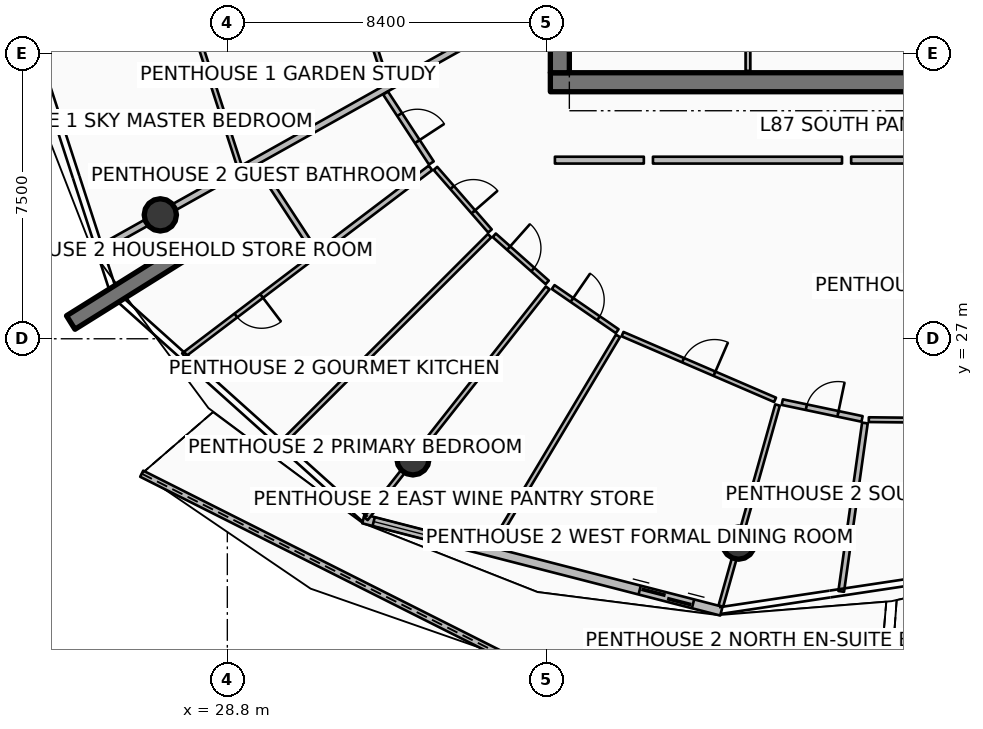
"""IFC4 building model, lengths in metres.
Left out: names, types, materials, properties, quantities, classifications, styles, units other than length and angle.
Written with IfcOpenShell. Run it as: python <this file> out.ifc"""

import sys

from ifc_helpers import new_model, si_unit, direction, frame, frame_2d, origin, origin_2d, place, context, subcontext, project, spatial, polyline, rectangle, circle, outline, extrude, element, fill, save


model = new_model("IFC4")
c1 = context("Model", 3, precision=1e-05, world=origin(), true_north=direction((0.0, 1.0)))
c2 = subcontext(c1, "Body", "Model", "MODEL_VIEW")
j1 = project(units=[si_unit("LENGTHUNIT", "METRE"), si_unit("PLANEANGLEUNIT", "RADIAN")], contexts=[c1])
p1 = place(None, origin())
s1 = spatial("IfcSite", under=j1, at=p1, CompositionType="ELEMENT")
p2 = place(p1, origin())
s2 = spatial("IfcBuilding", under=s1, at=p2, CompositionType="ELEMENT")
p3 = place(p2, frame((0.0, 0.0, 347.3)))
s3 = spatial("IfcBuildingStorey", under=s2, at=p3, CompositionType="ELEMENT", Elevation=347.3)
p4 = place(p3, frame((37.3, 33.75, 0.0), z_axis=(0.0, 0.0, 1.0), x_axis=(1.0, 0.0, 0.0)))
e1 = element("IfcWall", 1, at=p4, inside=s3, PredefinedType="SHEAR", context=c2, shape_type="SweptSolid", body=[
    extrude(rectangle(XDim=9.6, YDim=0.5, at=frame_2d((4.8, 0.0))), origin(), (0.0, 0.0, 1.0), 4.2),
])
p5 = place(p3, frame((37.55, 34.0, 0.0), z_axis=(0.0, 0.0, 1.0), x_axis=(0.0, 1.0, 0.0)))
e2 = element("IfcWall", 2, at=p5, inside=s3, PredefinedType="SHEAR", context=c2, shape_type="SweptSolid", body=[
    extrude(rectangle(XDim=16.0, YDim=0.5, at=frame_2d((8.0, 0.0))), origin(), (0.0, 0.0, 1.0), 4.2),
])
p6 = place(p3, frame((27.647, 29.282, 0.0), z_axis=(0.0, 0.0, 1.0), x_axis=(-0.848053161125, -0.529911158502, 0.0)))
e3 = element("IfcWall", 3, at=p6, inside=s3, PredefinedType="SOLIDWALL", context=c2, shape_type="SweptSolid", body=[
    extrude(rectangle(XDim=3.5, YDim=0.42, at=frame_2d((1.75, 0.0))), origin(), (0.0, 0.0, 1.0), 4.2),
])
p7 = place(p3, frame((27.037, 30.26, 0.0), z_axis=(0.234532013765, 0.131375056787, 0.96319018318), x_axis=(-0.488708510237, 0.872447128497, 0.0)))
e4 = element("IfcColumn", 4, at=p7, inside=s3, PredefinedType="COLUMN", context=c2, shape_type="SweptSolid", body=[
    extrude(circle(Radius=0.425, at=origin_2d()), origin(), (0.0, 0.0, 1.0), 3.945),
])
p8 = place(p3, frame((33.684, 23.841, 0.0), z_axis=(0.160640140705, 0.203700881396, 0.965764306709), x_axis=(-0.785213254806, 0.619225439139, 0.0)))
e5 = element("IfcColumn", 5, at=p8, inside=s3, PredefinedType="COLUMN", context=c2, shape_type="SweptSolid", body=[
    extrude(circle(Radius=0.425, at=origin_2d()), origin(), (0.0, 0.0, 1.0), 3.935),
])
p9 = place(p3, frame((42.253, 21.624, 0.0), z_axis=(0.064758926889, 0.229838041096, 0.971071962448), x_axis=(-0.96252315306, 0.271199520325, 0.0)))
e6 = element("IfcColumn", 6, at=p9, inside=s3, PredefinedType="COLUMN", context=c2, shape_type="SweptSolid", body=[
    extrude(circle(Radius=0.425, at=origin_2d()), origin(), (0.0, 0.0, 1.0), 3.913),
])
p10 = place(p3, frame((26.547, 23.449, 0.0), z_axis=(0.0, 0.0, 1.0), x_axis=(0.893288240785, -0.449484281009, 0.0)))
e7 = element("IfcWall", 7, at=p10, inside=s3, PredefinedType="PARAPET", context=c2, shape_type="SweptSolid", body=[
    extrude(outline(polyline([(0.0, 0.0), (10.573, 0.0), (10.573, 1.348), (5.287, 1.562), (0.0, 1.747), (0.0, 0.0)])), frame((0.0, 0.09, 0.0), z_axis=(0.0, -1.0, 0.0), x_axis=(1.0, 0.0, 0.0)), (0.0, 0.0, 1.0), 0.18),
])
p11 = place(p3, frame((46.298, 18.542, 0.0), z_axis=(0.0, 0.0, 1.0), x_axis=(0.977492987262, 0.210967911903, 0.0)))
e8 = element("IfcWall", 8, at=p11, inside=s3, PredefinedType="PARAPET", context=c2, shape_type="SweptSolid", body=[
    extrude(outline(polyline([(0.0, 0.0), (8.794, 0.0), (8.794, 1.348), (4.397, 1.182), (0.0, 1.12), (0.0, 0.0)])), frame((0.0, 0.09, 0.0), z_axis=(0.0, -1.0, 0.0), x_axis=(1.0, 0.0, 0.0)), (0.0, 0.0, 1.0), 0.18),
])
p12 = place(p3, frame((32.38, 22.26, 0.0), z_axis=(0.0, 0.0, 1.0), x_axis=(0.968389076094, -0.249444577616, 0.0)))
e9 = element("IfcWall", 9, at=p12, inside=s3, PredefinedType="SOLIDWALL", context=c2, shape_type="SweptSolid", body=[
    extrude(rectangle(XDim=9.728, YDim=0.24, at=frame_2d((4.864, 0.0))), origin(), (0.0, 0.0, 1.0), 2.75),
])
p13 = place(p12, frame((7.508, 0.0, 0.0)))
e10 = element("IfcOpeningElement", 10, at=p13, cuts=e9, PredefinedType="OPENING", context=c2, shape_type="SweptSolid", body=[
    extrude(rectangle(XDim=1.45, YDim=2.15, at=frame_2d((0.725, 1.075))), frame((0.0, 0.13, 0.0), z_axis=(0.0, -1.0, 0.0), x_axis=(1.0, 0.0, 0.0)), (0.0, 0.0, 1.0), 0.26),
])
p14 = place(p12, frame((0.28, 0.0, 0.65)))
e11 = element("IfcOpeningElement", 11, at=p14, cuts=e9, PredefinedType="OPENING", context=c2, shape_type="SweptSolid", body=[
    extrude(rectangle(XDim=1.6, YDim=1.5, at=frame_2d((0.8, 0.75))), frame((0.0, 0.13, 0.0), z_axis=(0.0, -1.0, 0.0), x_axis=(1.0, 0.0, 0.0)), (0.0, 0.0, 1.0), 0.26),
])
p15 = place(p3, frame((42.5, 34.05, 0.0), z_axis=(0.0, 0.0, 1.0), x_axis=(0.0, 1.0, 0.0)))
e12 = element("IfcWall", 12, at=p15, inside=s3, PredefinedType="PARTITIONING", context=c2, shape_type="SweptSolid", body=[
    extrude(rectangle(XDim=2.03, YDim=0.125, at=frame_2d((1.015, 0.0))), origin(), (0.0, 0.0, 1.0), 3.24),
])
p16 = place(p3, frame((37.204, 35.954, 0.0), z_axis=(0.0, 0.0, 1.0), x_axis=(-0.872495191914, -0.488622697064, 0.0)))
e13 = element("IfcWall", 13, at=p16, inside=s3, PredefinedType="PARTITIONING", context=c2, shape_type="SweptSolid", body=[
    extrude(rectangle(XDim=13.462, YDim=0.18, at=frame_2d((6.731, 0.0))), origin(), (0.0, 0.0, 1.0), 2.757),
])
p17 = place(p3, frame((30.99, 39.878, 0.0), z_axis=(0.0, 0.0, 1.0), x_axis=(0.309026406972, -0.951053457905, 0.0)))
e14 = element("IfcWall", 14, at=p17, inside=s3, PredefinedType="PARTITIONING", context=c2, shape_type="SweptSolid", body=[
    extrude(rectangle(XDim=6.477, YDim=0.125, at=frame_2d((3.238, 0.0))), origin(), (0.0, 0.0, 1.0), 2.757),
])
p18 = place(p17, frame((2.788, 0.0, 0.0)))
e15 = element("IfcOpeningElement", 15, at=p18, cuts=e14, PredefinedType="OPENING", context=c2, shape_type="SweptSolid", body=[
    extrude(rectangle(XDim=0.9, YDim=2.08, at=frame_2d((0.45, 1.04))), frame((0.0, 0.073, 0.0), z_axis=(0.0, -1.0, 0.0), x_axis=(1.0, 0.0, 0.0)), (0.0, 0.0, 1.0), 0.145),
])
p19 = place(p3, frame((26.581, 39.356, 0.0), z_axis=(0.0, 0.0, 1.0), x_axis=(0.309000666789, -0.951061821294, 0.0)))
e16 = element("IfcWall", 16, at=p19, inside=s3, PredefinedType="PARTITIONING", context=c2, shape_type="SweptSolid", body=[
    extrude(rectangle(XDim=8.209, YDim=0.125, at=frame_2d((4.104, 0.0))), origin(), (0.0, 0.0, 1.0), 2.757),
])
p20 = place(p19, frame((3.655, 0.0, 0.0)))
e17 = element("IfcOpeningElement", 17, at=p20, cuts=e16, PredefinedType="OPENING", context=c2, shape_type="SweptSolid", body=[
    extrude(rectangle(XDim=0.9, YDim=2.08, at=frame_2d((0.45, 1.04))), frame((0.0, 0.073, 0.0), z_axis=(0.0, -1.0, 0.0), x_axis=(1.0, 0.0, 0.0)), (0.0, 0.0, 1.0), 0.145),
])
p21 = place(p3, frame((37.42, 31.7, 0.0), z_axis=(0.0, 0.0, 1.0), x_axis=(1.0, 0.0, 0.0)))
e18 = element("IfcWall", 18, at=p21, inside=s3, PredefinedType="PARTITIONING", context=c2, shape_type="SweptSolid", body=[
    extrude(rectangle(XDim=2.34, YDim=0.18, at=frame_2d((1.17, 0.0))), origin(), (0.0, 0.0, 1.0), 2.757),
])
p22 = place(p3, frame((32.964, 33.465, 0.0), z_axis=(0.0, 0.0, 1.0), x_axis=(0.547736904717, -0.836650633903, 0.0)))
e19 = element("IfcWall", 19, at=p22, inside=s3, PredefinedType="PARTITIONING", context=c2, shape_type="SweptSolid", body=[
    extrude(rectangle(XDim=2.199, YDim=0.15, at=frame_2d((1.099, 0.0))), origin(), (0.0, 0.0, 1.0), 2.757),
])
p23 = place(p22, frame((0.674, 0.0, 0.0)))
e20 = element("IfcOpeningElement", 20, at=p23, cuts=e19, PredefinedType="OPENING", context=c2, shape_type="SweptSolid", body=[
    extrude(rectangle(XDim=0.85, YDim=2.06, at=frame_2d((0.425, 1.03))), frame((0.0, 0.085, 0.0), z_axis=(0.0, -1.0, 0.0), x_axis=(1.0, 0.0, 0.0)), (0.0, 0.0, 1.0), 0.17),
])
p24 = place(p3, frame((29.605, 31.584, 0.0), z_axis=(0.0, 0.0, 1.0), x_axis=(0.547706970619, -0.836670230339, 0.0)))
e21 = element("IfcWall", 21, at=p24, inside=s3, PredefinedType="PARTITIONING", context=c2, shape_type="SweptSolid", body=[
    extrude(rectangle(XDim=2.731, YDim=0.15, at=frame_2d((1.365, 0.0))), origin(), (0.0, 0.0, 1.0), 2.757),
])
p25 = place(p3, frame((34.146, 31.496, 0.0), z_axis=(0.0, 0.0, 1.0), x_axis=(-0.796862333182, -0.60416092389, 0.0)))
e22 = element("IfcWall", 22, at=p25, inside=s3, PredefinedType="PARTITIONING", context=c2, shape_type="SweptSolid", body=[
    extrude(rectangle(XDim=3.72, YDim=0.15, at=frame_2d((1.86, 0.0))), origin(), (0.0, 0.0, 1.0), 3.24),
])
p26 = place(p3, frame((31.078, 29.17, 0.0), z_axis=(0.0, 0.0, 1.0), x_axis=(-0.796851341582, -0.604175421064, 0.0)))
e23 = element("IfcWall", 23, at=p26, inside=s3, PredefinedType="PARTITIONING", context=c2, shape_type="SweptSolid", body=[
    extrude(rectangle(XDim=4.304, YDim=0.125, at=frame_2d((2.152, 0.0))), origin(), (0.0, 0.0, 1.0), 2.775),
])
p27 = place(p26, frame((1.727, 0.0, 0.0)))
e24 = element("IfcOpeningElement", 24, at=p27, cuts=e23, PredefinedType="OPENING", context=c2, shape_type="SweptSolid", body=[
    extrude(rectangle(XDim=0.85, YDim=2.06, at=frame_2d((0.425, 1.03))), frame((0.0, 0.073, 0.0), z_axis=(0.0, -1.0, 0.0), x_axis=(1.0, 0.0, 0.0)), (0.0, 0.0, 1.0), 0.145),
])
p28 = place(p3, frame((35.7, 29.713, 0.0), z_axis=(0.0, 0.0, 1.0), x_axis=(-0.707470011435, -0.706743364256, 0.0)))
e25 = element("IfcWall", 25, at=p28, inside=s3, PredefinedType="PARTITIONING", context=c2, shape_type="SweptSolid", body=[
    extrude(rectangle(XDim=7.728, YDim=0.125, at=frame_2d((3.864, 0.0))), origin(), (0.0, 0.0, 1.0), 2.775),
])
p29 = place(p3, frame((34.277, 31.482, 0.0), z_axis=(0.0, 0.0, 1.0), x_axis=(0.656959210167, -0.753926121167, 0.0)))
e26 = element("IfcWall", 26, at=p29, inside=s3, PredefinedType="PARTITIONING", context=c2, shape_type="SweptSolid", body=[
    extrude(rectangle(XDim=2.183, YDim=0.125, at=frame_2d((1.091, 0.0))), origin(), (0.0, 0.0, 1.0), 3.24),
])
p30 = place(p29, frame((0.667, 0.0, 0.0)))
e27 = element("IfcOpeningElement", 27, at=p30, cuts=e26, PredefinedType="OPENING", context=c2, shape_type="SweptSolid", body=[
    extrude(rectangle(XDim=0.85, YDim=2.06, at=frame_2d((0.425, 1.03))), frame((0.0, 0.073, 0.0), z_axis=(0.0, -1.0, 0.0), x_axis=(1.0, 0.0, 0.0)), (0.0, 0.0, 1.0), 0.145),
])
p31 = place(p3, frame((35.823, 29.723, 0.0), z_axis=(0.0, 0.0, 1.0), x_axis=(0.747438201164, -0.664331344617, 0.0)))
e28 = element("IfcWall", 28, at=p31, inside=s3, PredefinedType="PARTITIONING", context=c2, shape_type="SweptSolid", body=[
    extrude(rectangle(XDim=1.865, YDim=0.125, at=frame_2d((0.933, 0.0))), origin(), (0.0, 0.0, 1.0), 2.757),
])
p32 = place(p31, frame((0.508, 0.0, 0.0)))
e29 = element("IfcOpeningElement", 29, at=p32, cuts=e28, PredefinedType="OPENING", context=c2, shape_type="SweptSolid", body=[
    extrude(rectangle(XDim=0.85, YDim=2.06, at=frame_2d((0.425, 1.03))), frame((0.0, 0.073, 0.0), z_axis=(0.0, -1.0, 0.0), x_axis=(1.0, 0.0, 0.0)), (0.0, 0.0, 1.0), 0.145),
])
p33 = place(p3, frame((40.0, 31.7, 0.0), z_axis=(0.0, 0.0, 1.0), x_axis=(1.0, 0.0, 0.0)))
e30 = element("IfcWall", 30, at=p33, inside=s3, PredefinedType="PARTITIONING", context=c2, shape_type="SweptSolid", body=[
    extrude(rectangle(XDim=4.975, YDim=0.18, at=frame_2d((2.488, 0.0))), origin(), (0.0, 0.0, 1.0), 2.757),
])
p34 = place(p3, frame((37.23, 28.339, 0.0), z_axis=(0.0, 0.0, 1.0), x_axis=(-0.619087123863, -0.785322311581, 0.0)))
e31 = element("IfcWall", 31, at=p34, inside=s3, PredefinedType="PARTITIONING", context=c2, shape_type="SweptSolid", body=[
    extrude(rectangle(XDim=7.731, YDim=0.125, at=frame_2d((3.865, 0.0))), origin(), (0.0, 0.0, 1.0), 2.757),
])
p35 = place(p3, frame((39.079, 27.077, 0.0), z_axis=(0.0, 0.0, 1.0), x_axis=(-0.513104404823, -0.858326202414, 0.0)))
e32 = element("IfcWall", 32, at=p35, inside=s3, PredefinedType="PARTITIONING", context=c2, shape_type="SweptSolid", body=[
    extrude(rectangle(XDim=6.48, YDim=0.125, at=frame_2d((3.24, 0.0))), origin(), (0.0, 0.0, 1.0), 2.775),
])
p36 = place(p3, frame((37.375, 28.361, 0.0), z_axis=(0.0, 0.0, 1.0), x_axis=(0.823529894266, -0.567272873712, 0.0)))
e33 = element("IfcWall", 33, at=p36, inside=s3, PredefinedType="PARTITIONING", context=c2, shape_type="SweptSolid", body=[
    extrude(rectangle(XDim=2.046, YDim=0.125, at=frame_2d((1.023, 0.0))), origin(), (0.0, 0.0, 1.0), 2.757),
])
p37 = place(p36, frame((0.598, 0.0, 0.0)))
e34 = element("IfcOpeningElement", 34, at=p37, cuts=e33, PredefinedType="OPENING", context=c2, shape_type="SweptSolid", body=[
    extrude(rectangle(XDim=0.85, YDim=2.06, at=frame_2d((0.425, 1.03))), frame((0.0, 0.073, 0.0), z_axis=(0.0, -1.0, 0.0), x_axis=(1.0, 0.0, 0.0)), (0.0, 0.0, 1.0), 0.145),
])
p38 = place(p3, frame((39.199, 27.123, 0.0), z_axis=(0.0, 0.0, 1.0), x_axis=(0.918386386282, -0.395684780466, 0.0)))
e35 = element("IfcWall", 35, at=p38, inside=s3, PredefinedType="PARTITIONING", context=c2, shape_type="SweptSolid", body=[
    extrude(rectangle(XDim=4.371, YDim=0.125, at=frame_2d((2.186, 0.0))), origin(), (0.0, 0.0, 1.0), 2.757),
])
p39 = place(p38, frame((1.736, 0.0, 0.0)))
e36 = element("IfcOpeningElement", 36, at=p39, cuts=e35, PredefinedType="OPENING", context=c2, shape_type="SweptSolid", body=[
    extrude(rectangle(XDim=0.9, YDim=2.08, at=frame_2d((0.45, 1.04))), frame((0.0, 0.073, 0.0), z_axis=(0.0, -1.0, 0.0), x_axis=(1.0, 0.0, 0.0)), (0.0, 0.0, 1.0), 0.145),
])
p40 = place(p3, frame((45.215, 31.7, 0.0), z_axis=(0.0, 0.0, 1.0), x_axis=(1.0, 0.0, 0.0)))
e37 = element("IfcWall", 37, at=p40, inside=s3, PredefinedType="PARTITIONING", context=c2, shape_type="SweptSolid", body=[
    extrude(rectangle(XDim=3.884, YDim=0.18, at=frame_2d((1.942, 0.0))), origin(), (0.0, 0.0, 1.0), 2.757),
])
p41 = place(p3, frame((43.278, 25.257, 0.0), z_axis=(0.0, 0.0, 1.0), x_axis=(-0.271458055223, -0.962450271055, 0.0)))
e38 = element("IfcWall", 38, at=p41, inside=s3, PredefinedType="PARTITIONING", context=c2, shape_type="SweptSolid", body=[
    extrude(rectangle(XDim=5.497, YDim=0.125, at=frame_2d((2.749, 0.0))), origin(), (0.0, 0.0, 1.0), 2.757),
])
p42 = place(p3, frame((43.403, 25.333, 0.0), z_axis=(0.0, 0.0, 1.0), x_axis=(0.978565484163, -0.205935895864, 0.0)))
e39 = element("IfcWall", 39, at=p42, inside=s3, PredefinedType="PARTITIONING", context=c2, shape_type="SweptSolid", body=[
    extrude(rectangle(XDim=2.145, YDim=0.15, at=frame_2d((1.072, 0.0))), origin(), (0.0, 0.0, 1.0), 2.757),
])
p43 = place(p42, frame((0.647, 0.0, 0.0)))
e40 = element("IfcOpeningElement", 40, at=p43, cuts=e39, PredefinedType="OPENING", context=c2, shape_type="SweptSolid", body=[
    extrude(rectangle(XDim=0.85, YDim=2.06, at=frame_2d((0.425, 1.03))), frame((0.0, 0.085, 0.0), z_axis=(0.0, -1.0, 0.0), x_axis=(1.0, 0.0, 0.0)), (0.0, 0.0, 1.0), 0.17),
])
p44 = place(p3, frame((45.577, 24.784, 0.0), z_axis=(0.0, 0.0, 1.0), x_axis=(-0.139343441712, -0.99024411397, 0.0)))
e41 = element("IfcWall", 41, at=p44, inside=s3, PredefinedType="PARTITIONING", context=c2, shape_type="SweptSolid", body=[
    extrude(rectangle(XDim=4.475, YDim=0.15, at=frame_2d((2.237, 0.0))), origin(), (0.0, 0.0, 1.0), 2.775),
])
p45 = place(p3, frame((45.68, 24.872, 0.0), z_axis=(0.0, 0.0, 1.0), x_axis=(0.99993989629, -0.010963749724, 0.0)))
e42 = element("IfcWall", 42, at=p45, inside=s3, PredefinedType="PARTITIONING", context=c2, shape_type="SweptSolid", body=[
    extrude(rectangle(XDim=4.253, YDim=0.125, at=frame_2d((2.126, 0.0))), origin(), (0.0, 0.0, 1.0), 3.24),
])
p46 = place(p45, frame((1.677, 0.0, 0.0)))
e43 = element("IfcOpeningElement", 43, at=p46, cuts=e42, PredefinedType="OPENING", context=c2, shape_type="SweptSolid", body=[
    extrude(rectangle(XDim=0.9, YDim=2.08, at=frame_2d((0.45, 1.04))), frame((0.0, 0.073, 0.0), z_axis=(0.0, -1.0, 0.0), x_axis=(1.0, 0.0, 0.0)), (0.0, 0.0, 1.0), 0.145),
])
p47 = place(p13, origin())
e44 = element("IfcDoor", 44, at=p47, inside=s3, OperationType="DOUBLE_DOOR_SLIDING", PredefinedType="DOOR", context=c2, shape_type="SweptSolid", body=[
    extrude(rectangle(XDim=1.45, YDim=2.15, at=frame_2d((0.725, 1.075))), frame((0.0, 0.025, 0.0), z_axis=(0.0, -1.0, 0.0), x_axis=(1.0, 0.0, 0.0)), (0.0, 0.0, 1.0), 0.05),
])
fill(e10, e44)
p48 = place(p14, origin())
e45 = element("IfcWindow", 45, at=p48, inside=s3, PartitioningType="SINGLE_PANEL", PredefinedType="WINDOW", context=c2, shape_type="SweptSolid", body=[
    extrude(rectangle(XDim=1.6, YDim=1.5, at=frame_2d((0.8, 0.75))), frame((0.0, 0.03, 0.0), z_axis=(0.0, -1.0, 0.0), x_axis=(1.0, 0.0, 0.0)), (0.0, 0.0, 1.0), 0.06),
])
fill(e11, e45)
p49 = place(p23, origin())
e46 = element("IfcDoor", 46, at=p49, inside=s3, OperationType="SINGLE_SWING_RIGHT", PredefinedType="DOOR", context=c2, shape_type="SweptSolid", body=[
    extrude(rectangle(XDim=0.85, YDim=2.06, at=frame_2d((0.425, 1.03))), frame((0.0, 0.025, 0.0), z_axis=(0.0, -1.0, 0.0), x_axis=(1.0, 0.0, 0.0)), (0.0, 0.0, 1.0), 0.05),
])
fill(e20, e46)
p50 = place(p27, origin())
e47 = element("IfcDoor", 47, at=p50, inside=s3, OperationType="SINGLE_SWING_LEFT", PredefinedType="DOOR", context=c2, shape_type="SweptSolid", body=[
    extrude(rectangle(XDim=0.85, YDim=2.06, at=frame_2d((0.425, 1.03))), frame((0.0, 0.025, 0.0), z_axis=(0.0, -1.0, 0.0), x_axis=(1.0, 0.0, 0.0)), (0.0, 0.0, 1.0), 0.05),
])
fill(e24, e47)
p51 = place(p30, origin())
e48 = element("IfcDoor", 48, at=p51, inside=s3, OperationType="SINGLE_SWING_RIGHT", PredefinedType="DOOR", context=c2, shape_type="SweptSolid", body=[
    extrude(rectangle(XDim=0.85, YDim=2.06, at=frame_2d((0.425, 1.03))), frame((0.0, 0.025, 0.0), z_axis=(0.0, -1.0, 0.0), x_axis=(1.0, 0.0, 0.0)), (0.0, 0.0, 1.0), 0.05),
])
fill(e27, e48)
p52 = place(p32, origin())
e49 = element("IfcDoor", 49, at=p52, inside=s3, OperationType="SINGLE_SWING_LEFT", PredefinedType="DOOR", context=c2, shape_type="SweptSolid", body=[
    extrude(rectangle(XDim=0.85, YDim=2.06, at=frame_2d((0.425, 1.03))), frame((0.0, 0.025, 0.0), z_axis=(0.0, -1.0, 0.0), x_axis=(1.0, 0.0, 0.0)), (0.0, 0.0, 1.0), 0.05),
])
fill(e29, e49)
p53 = place(p37, origin())
e50 = element("IfcDoor", 50, at=p53, inside=s3, OperationType="SINGLE_SWING_LEFT", PredefinedType="DOOR", context=c2, shape_type="SweptSolid", body=[
    extrude(rectangle(XDim=0.85, YDim=2.06, at=frame_2d((0.425, 1.03))), frame((0.0, 0.025, 0.0), z_axis=(0.0, -1.0, 0.0), x_axis=(1.0, 0.0, 0.0)), (0.0, 0.0, 1.0), 0.05),
])
fill(e34, e50)
p54 = place(p39, origin())
e51 = element("IfcDoor", 51, at=p54, inside=s3, OperationType="SINGLE_SWING_RIGHT", PredefinedType="DOOR", context=c2, shape_type="SweptSolid", body=[
    extrude(rectangle(XDim=0.9, YDim=2.08, at=frame_2d((0.45, 1.04))), frame((0.0, 0.025, 0.0), z_axis=(0.0, -1.0, 0.0), x_axis=(1.0, 0.0, 0.0)), (0.0, 0.0, 1.0), 0.05),
])
fill(e36, e51)
p55 = place(p43, origin())
e52 = element("IfcDoor", 52, at=p55, inside=s3, OperationType="SINGLE_SWING_RIGHT", PredefinedType="DOOR", context=c2, shape_type="SweptSolid", body=[
    extrude(rectangle(XDim=0.85, YDim=2.06, at=frame_2d((0.425, 1.03))), frame((0.0, 0.025, 0.0), z_axis=(0.0, -1.0, 0.0), x_axis=(1.0, 0.0, 0.0)), (0.0, 0.0, 1.0), 0.05),
])
fill(e40, e52)
save(model, sys.argv[1])
